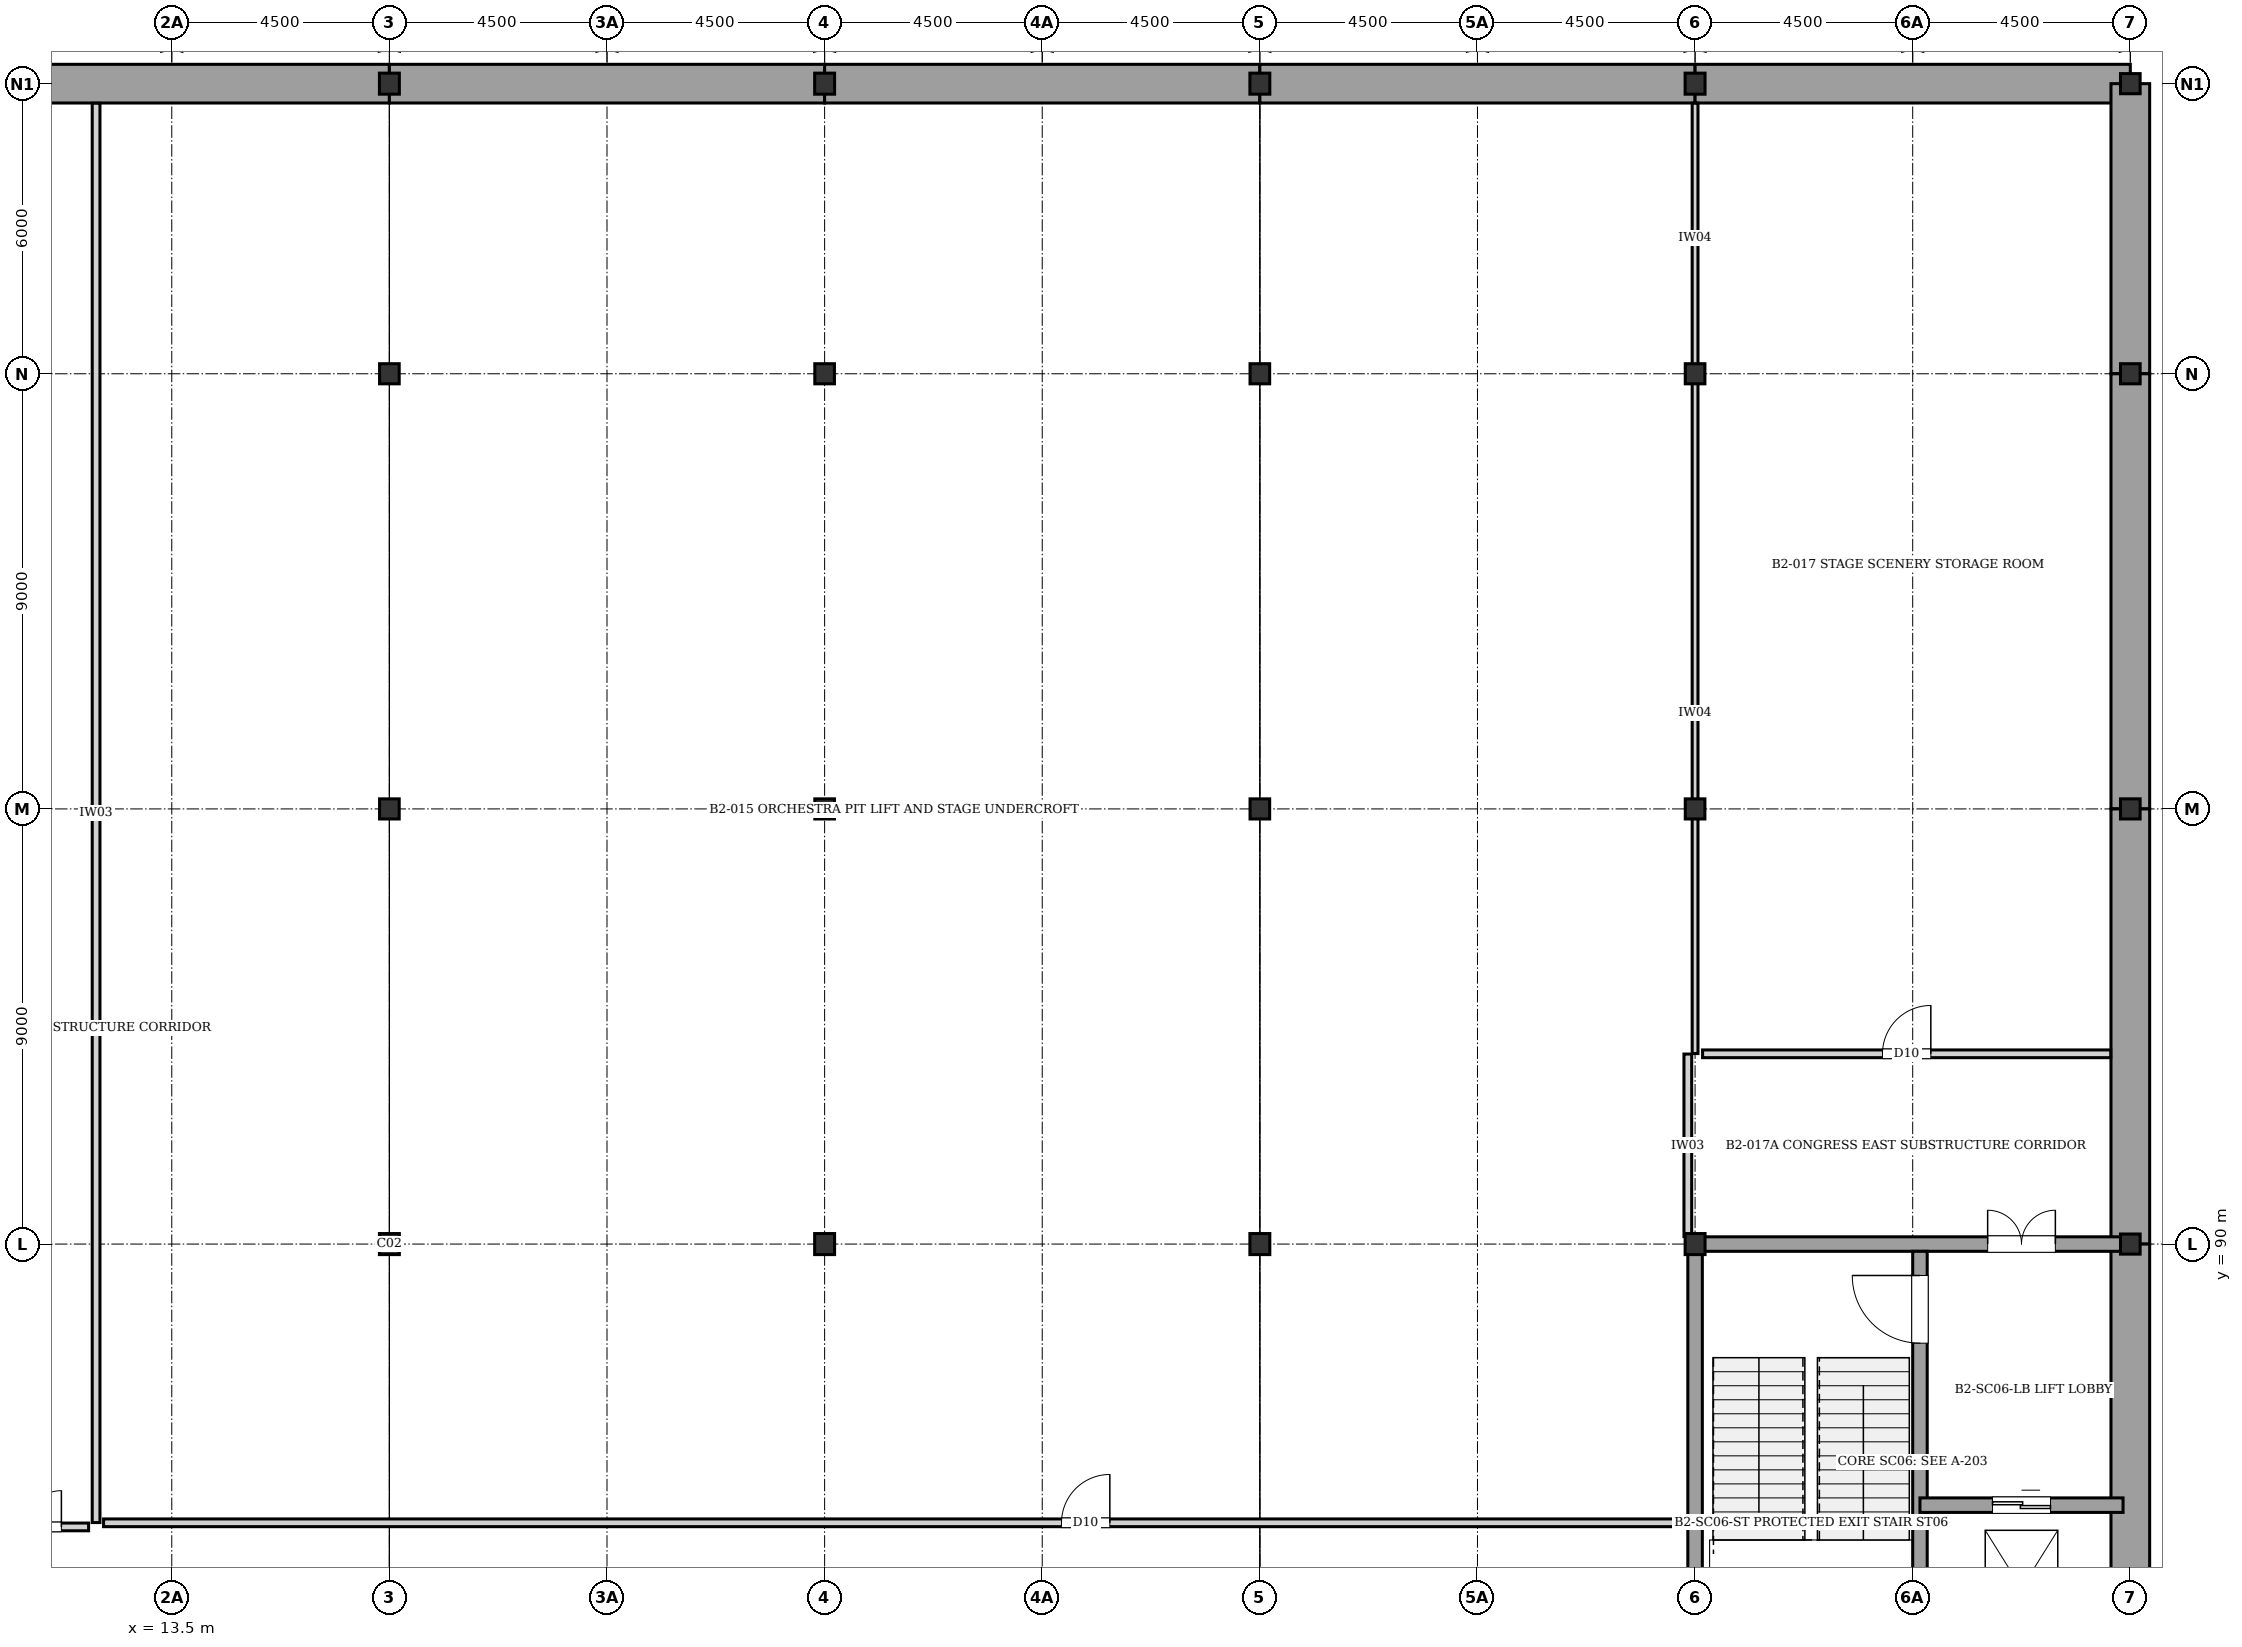
"""IFC4 building model, lengths in metres.
Left out: names, types, materials, properties, quantities, classifications, styles, units other than length and angle.
Written with IfcOpenShell. Run it as: python <this file> out.ifc"""

import sys

from ifc_helpers import new_model, si_unit, direction, frame, frame_2d, origin, origin_2d, place, context, subcontext, project, spatial, rectangle, i_section, extrude, element, fill, save


model = new_model("IFC4")
c1 = context("Model", 3, precision=1e-05, world=origin(), true_north=direction((0.0, 1.0)))
c2 = subcontext(c1, "Body", "Model", "MODEL_VIEW")
j1 = project(units=[si_unit("LENGTHUNIT", "METRE"), si_unit("PLANEANGLEUNIT", "RADIAN")], contexts=[c1])
p1 = place(None, origin())
s1 = spatial("IfcSite", under=j1, at=p1, CompositionType="ELEMENT")
p2 = place(p1, origin())
s2 = spatial("IfcBuilding", under=s1, at=p2, CompositionType="ELEMENT")
p3 = place(p2, frame((0.0, 0.0, -8.96)))
s3 = spatial("IfcBuildingStorey", under=s2, at=p3, CompositionType="ELEMENT", Elevation=-8.96)
p4 = place(p3, frame((18.0, 90.0, 0.0), z_axis=(0.0, 0.0, 1.0), x_axis=(1.0, 0.0, 0.0)))
e1 = element("IfcColumn", 1, at=p4, inside=s3, PredefinedType="COLUMN", context=c2, shape_type="SweptSolid", body=[
    extrude(i_section(OverallWidth=0.412, OverallDepth=0.435, WebThickness=0.027, FlangeThickness=0.046, at=origin_2d()), origin(), (0.0, 0.0, 1.0), 4.48),
])
for number, where, z_axis, x_axis in (
    (2, (18.0, 99.0, 0.0), (0.0, 0.0, 1.0), (1.0, 0.0, 0.0)),
    (3, (18.0, 108.0, 0.0), (0.0, 0.0, 1.0), (1.0, 0.0, 0.0)),
):
    element("IfcColumn", number, at=place(p3, frame(where, z_axis=z_axis, x_axis=x_axis)), inside=s3, PredefinedType="COLUMN", context=c2, shape_type="SweptSolid", body=[
        extrude(i_section(OverallWidth=0.406, OverallDepth=0.416, WebThickness=0.022, FlangeThickness=0.038, at=origin_2d()), origin(), (0.0, 0.0, 1.0), 4.48),
    ])
for number, where, z_axis, x_axis in (
    (4, (18.0, 114.0, 0.0), (0.0, 0.0, 1.0), (1.0, 0.0, 0.0)),
    (5, (27.0, 90.0, 0.0), (0.0, 0.0, 1.0), (1.0, 0.0, 0.0)),
):
    element("IfcColumn", number, at=place(p3, frame(where, z_axis=z_axis, x_axis=x_axis)), inside=s3, PredefinedType="COLUMN", context=c2, shape_type="SweptSolid", body=[
        extrude(i_section(OverallWidth=0.412, OverallDepth=0.435, WebThickness=0.027, FlangeThickness=0.046, at=origin_2d()), origin(), (0.0, 0.0, 1.0), 4.48),
    ])
for number, where, z_axis, x_axis in (
    (6, (27.0, 99.0, 0.0), (0.0, 0.0, 1.0), (1.0, 0.0, 0.0)),
    (7, (27.0, 108.0, 0.0), (0.0, 0.0, 1.0), (1.0, 0.0, 0.0)),
):
    element("IfcColumn", number, at=place(p3, frame(where, z_axis=z_axis, x_axis=x_axis)), inside=s3, PredefinedType="COLUMN", context=c2, shape_type="SweptSolid", body=[
        extrude(i_section(OverallWidth=0.406, OverallDepth=0.416, WebThickness=0.022, FlangeThickness=0.038, at=origin_2d()), origin(), (0.0, 0.0, 1.0), 4.48),
    ])
for number, where, z_axis, x_axis in (
    (8, (27.0, 114.0, 0.0), (0.0, 0.0, 1.0), (1.0, 0.0, 0.0)),
    (9, (36.0, 90.0, 0.0), (0.0, 0.0, 1.0), (1.0, 0.0, 0.0)),
):
    element("IfcColumn", number, at=place(p3, frame(where, z_axis=z_axis, x_axis=x_axis)), inside=s3, PredefinedType="COLUMN", context=c2, shape_type="SweptSolid", body=[
        extrude(i_section(OverallWidth=0.412, OverallDepth=0.435, WebThickness=0.027, FlangeThickness=0.046, at=origin_2d()), origin(), (0.0, 0.0, 1.0), 4.48),
    ])
for number, where, z_axis, x_axis in (
    (10, (36.0, 99.0, 0.0), (0.0, 0.0, 1.0), (1.0, 0.0, 0.0)),
    (11, (36.0, 108.0, 0.0), (0.0, 0.0, 1.0), (1.0, 0.0, 0.0)),
):
    element("IfcColumn", number, at=place(p3, frame(where, z_axis=z_axis, x_axis=x_axis)), inside=s3, PredefinedType="COLUMN", context=c2, shape_type="SweptSolid", body=[
        extrude(i_section(OverallWidth=0.406, OverallDepth=0.416, WebThickness=0.022, FlangeThickness=0.038, at=origin_2d()), origin(), (0.0, 0.0, 1.0), 4.48),
    ])
for number, where, z_axis, x_axis in (
    (12, (36.0, 114.0, 0.0), (0.0, 0.0, 1.0), (1.0, 0.0, 0.0)),
    (13, (45.0, 90.0, 0.0), (0.0, 0.0, 1.0), (1.0, 0.0, 0.0)),
):
    element("IfcColumn", number, at=place(p3, frame(where, z_axis=z_axis, x_axis=x_axis)), inside=s3, PredefinedType="COLUMN", context=c2, shape_type="SweptSolid", body=[
        extrude(i_section(OverallWidth=0.412, OverallDepth=0.435, WebThickness=0.027, FlangeThickness=0.046, at=origin_2d()), origin(), (0.0, 0.0, 1.0), 4.48),
    ])
for number, where, z_axis, x_axis in (
    (14, (45.0, 99.0, 0.0), (0.0, 0.0, 1.0), (1.0, 0.0, 0.0)),
    (15, (45.0, 108.0, 0.0), (0.0, 0.0, 1.0), (1.0, 0.0, 0.0)),
):
    element("IfcColumn", number, at=place(p3, frame(where, z_axis=z_axis, x_axis=x_axis)), inside=s3, PredefinedType="COLUMN", context=c2, shape_type="SweptSolid", body=[
        extrude(i_section(OverallWidth=0.406, OverallDepth=0.416, WebThickness=0.022, FlangeThickness=0.038, at=origin_2d()), origin(), (0.0, 0.0, 1.0), 4.48),
    ])
p5 = place(p3, frame((45.0, 114.0, 0.0), z_axis=(0.0, 0.0, 1.0), x_axis=(1.0, 0.0, 0.0)))
e16 = element("IfcColumn", 16, at=p5, inside=s3, PredefinedType="COLUMN", context=c2, shape_type="SweptSolid", body=[
    extrude(i_section(OverallWidth=0.412, OverallDepth=0.435, WebThickness=0.027, FlangeThickness=0.046, at=origin_2d()), origin(), (0.0, 0.0, 1.0), 4.48),
])
for number, where, z_axis, x_axis in (
    (17, (54.0, 90.0, 0.0), (0.0, 0.0, 1.0), (1.0, 0.0, 0.0)),
    (18, (54.0, 99.0, 0.0), (0.0, 0.0, 1.0), (1.0, 0.0, 0.0)),
    (19, (54.0, 108.0, 0.0), (0.0, 0.0, 1.0), (1.0, 0.0, 0.0)),
    (20, (54.0, 114.0, 0.0), (0.0, 0.0, 1.0), (1.0, 0.0, 0.0)),
):
    element("IfcColumn", number, at=place(p3, frame(where, z_axis=z_axis, x_axis=x_axis)), inside=s3, PredefinedType="COLUMN", context=c2, shape_type="SweptSolid", body=[
        extrude(i_section(OverallWidth=0.406, OverallDepth=0.416, WebThickness=0.022, FlangeThickness=0.038, at=origin_2d()), origin(), (0.0, 0.0, 1.0), 4.48),
    ])
for number, where, z_axis, x_axis in (
    (21, (9.0, 114.0, 0.0), (0.0, 0.0, 1.0), (1.0, 0.0, 0.0)),
    (22, (18.0, 114.0, 0.0), (0.0, 0.0, 1.0), (1.0, 0.0, 0.0)),
    (23, (27.0, 114.0, 0.0), (0.0, 0.0, 1.0), (1.0, 0.0, 0.0)),
    (24, (36.0, 114.0, 0.0), (0.0, 0.0, 1.0), (1.0, 0.0, 0.0)),
    (25, (45.0, 114.0, 0.0), (0.0, 0.0, 1.0), (1.0, 0.0, 0.0)),
):
    element("IfcWall", number, at=place(p3, frame(where, z_axis=z_axis, x_axis=x_axis)), inside=s3, PredefinedType="USERDEFINED", context=c2, shape_type="SweptSolid", body=[
        extrude(rectangle(XDim=9.0, YDim=0.8, at=frame_2d((4.5, 0.0))), origin(), (0.0, 0.0, 1.0), 4.2),
    ])
p6 = place(p3, frame((54.0, 114.0, 0.0), z_axis=(0.0, 0.0, 1.0), x_axis=(0.0, -1.0, 0.0)))
e26 = element("IfcWall", 26, at=p6, inside=s3, PredefinedType="USERDEFINED", context=c2, shape_type="SweptSolid", body=[
    extrude(rectangle(XDim=6.0, YDim=0.8, at=frame_2d((3.0, 0.0))), origin(), (0.0, 0.0, 1.0), 4.2),
])
for number, where, z_axis, x_axis in (
    (27, (54.0, 108.0, 0.0), (0.0, 0.0, 1.0), (0.0, -1.0, 0.0)),
    (28, (54.0, 99.0, 0.0), (0.0, 0.0, 1.0), (0.0, -1.0, 0.0)),
    (29, (54.0, 90.0, 0.0), (0.0, 0.0, 1.0), (0.0, -1.0, 0.0)),
):
    element("IfcWall", number, at=place(p3, frame(where, z_axis=z_axis, x_axis=x_axis)), inside=s3, PredefinedType="USERDEFINED", context=c2, shape_type="SweptSolid", body=[
        extrude(rectangle(XDim=9.0, YDim=0.8, at=frame_2d((4.5, 0.0))), origin(), (0.0, 0.0, 1.0), 4.2),
    ])
p7 = place(p3, frame((45.0, 90.0, 0.0), z_axis=(0.0, 0.0, 1.0), x_axis=(1.0, 0.0, 0.0)))
e30 = element("IfcWall", 30, at=p7, inside=s3, PredefinedType="SHEAR", context=c2, shape_type="SweptSolid", body=[
    extrude(rectangle(XDim=9.0, YDim=0.3, at=frame_2d((4.5, 0.0))), origin(), (0.0, 0.0, 1.0), 4.2),
])
p8 = place(p7, frame((6.05, 0.0, 0.0)))
e31 = element("IfcOpeningElement", 31, at=p8, cuts=e30, PredefinedType="OPENING", context=c2, shape_type="SweptSolid", body=[
    extrude(rectangle(XDim=1.4, YDim=2.02, at=frame_2d((0.7, 1.01))), frame((0.0, 0.16, 0.0), z_axis=(0.0, -1.0, 0.0), x_axis=(1.0, 0.0, 0.0)), (0.0, 0.0, 1.0), 0.32),
])
p9 = place(p3, frame((45.0, 81.0, 0.0), z_axis=(0.0, 0.0, 1.0), x_axis=(0.0, 1.0, 0.0)))
e32 = element("IfcWall", 32, at=p9, inside=s3, PredefinedType="SHEAR", context=c2, shape_type="SweptSolid", body=[
    extrude(rectangle(XDim=9.0, YDim=0.3, at=frame_2d((4.5, 0.0))), origin(), (0.0, 0.0, 1.0), 4.2),
])
p10 = place(p3, frame((49.65, 81.15, 0.0), z_axis=(0.0, 0.0, 1.0), x_axis=(0.0, 1.0, 0.0)))
e33 = element("IfcWall", 33, at=p10, inside=s3, PredefinedType="SHEAR", context=c2, shape_type="SweptSolid", body=[
    extrude(rectangle(XDim=8.7, YDim=0.3, at=frame_2d((4.35, 0.0))), origin(), (0.0, 0.0, 1.0), 4.2),
])
p11 = place(p10, frame((6.8, 0.0, 0.0)))
e34 = element("IfcOpeningElement", 34, at=p11, cuts=e33, PredefinedType="OPENING", context=c2, shape_type="SweptSolid", body=[
    extrude(rectangle(XDim=1.4, YDim=2.02, at=frame_2d((0.7, 1.01))), frame((0.0, 0.16, 0.0), z_axis=(0.0, -1.0, 0.0), x_axis=(1.0, 0.0, 0.0)), (0.0, 0.0, 1.0), 0.32),
])
p12 = place(p3, frame((49.65, 84.6, 0.0), z_axis=(0.0, 0.0, 1.0), x_axis=(1.0, 0.0, 0.0)))
e35 = element("IfcWall", 35, at=p12, inside=s3, PredefinedType="SHEAR", context=c2, shape_type="SweptSolid", body=[
    extrude(rectangle(XDim=4.2, YDim=0.3, at=frame_2d((2.1, 0.0))), origin(), (0.0, 0.0, 1.0), 4.2),
])
p13 = place(p12, frame((1.5, 0.0, 0.0)))
e36 = element("IfcOpeningElement", 36, at=p13, cuts=e35, PredefinedType="OPENING", context=c2, shape_type="SweptSolid", body=[
    extrude(rectangle(XDim=1.2, YDim=2.2, at=frame_2d((0.6, 1.1))), frame((0.0, 0.16, 0.0), z_axis=(0.0, -1.0, 0.0), x_axis=(1.0, 0.0, 0.0)), (0.0, 0.0, 1.0), 0.32),
])
p14 = place(p3, frame((11.935, 84.24, 0.0), z_axis=(0.0, 0.0, 1.0), x_axis=(0.0, 1.0, 0.0)))
e37 = element("IfcWall", 37, at=p14, inside=s3, PredefinedType="PARTITIONING", context=c2, shape_type="SweptSolid", body=[
    extrude(rectangle(XDim=29.355, YDim=0.16, at=frame_2d((14.677, 0.0))), origin(), (0.0, 0.0, 1.0), 4.2),
])
p15 = place(p3, frame((44.85, 90.155, 0.0), z_axis=(0.0, 0.0, 1.0), x_axis=(0.0, 1.0, 0.0)))
e38 = element("IfcWall", 38, at=p15, inside=s3, PredefinedType="PARTITIONING", context=c2, shape_type="SweptSolid", body=[
    extrude(rectangle(XDim=3.775, YDim=0.16, at=frame_2d((1.887, 0.0))), origin(), (0.0, 0.0, 1.0), 3.3),
])
p16 = place(p3, frame((45.0, 93.94, 0.0), z_axis=(0.0, 0.0, 1.0), x_axis=(0.0, 1.0, 0.0)))
e39 = element("IfcWall", 39, at=p16, inside=s3, PredefinedType="PARTITIONING", context=c2, shape_type="SweptSolid", body=[
    extrude(rectangle(XDim=14.08, YDim=0.12, at=frame_2d((7.04, 0.0))), origin(), (0.0, 0.0, 1.0), 3.3),
])
p17 = place(p3, frame((9.155, 84.15, 0.0), z_axis=(0.0, 0.0, 1.0), x_axis=(1.0, 0.0, 0.0)))
e40 = element("IfcWall", 40, at=p17, inside=s3, PredefinedType="PARTITIONING", context=c2, shape_type="SweptSolid", body=[
    extrude(rectangle(XDim=2.625, YDim=0.16, at=frame_2d((1.312, 0.0))), origin(), (0.0, 0.0, 1.0), 4.2),
])
p18 = place(p17, frame((0.562, 0.0, 0.0)))
e41 = element("IfcOpeningElement", 41, at=p18, cuts=e40, PredefinedType="OPENING", context=c2, shape_type="SweptSolid", body=[
    extrude(rectangle(XDim=1.5, YDim=2.1, at=frame_2d((0.75, 1.05))), frame((0.0, 0.09, 0.0), z_axis=(0.0, -1.0, 0.0), x_axis=(1.0, 0.0, 0.0)), (0.0, 0.0, 1.0), 0.18),
])
p19 = place(p3, frame((12.09, 84.235, 0.0), z_axis=(0.0, 0.0, 1.0), x_axis=(1.0, 0.0, 0.0)))
e42 = element("IfcWall", 42, at=p19, inside=s3, PredefinedType="PARTITIONING", context=c2, shape_type="SweptSolid", body=[
    extrude(rectangle(XDim=32.755, YDim=0.16, at=frame_2d((16.377, 0.0))), origin(), (0.0, 0.0, 1.0), 4.2),
])
p20 = place(p19, frame((19.808, 0.0, 0.0)))
e43 = element("IfcOpeningElement", 43, at=p20, cuts=e42, PredefinedType="OPENING", context=c2, shape_type="SweptSolid", body=[
    extrude(rectangle(XDim=1.0, YDim=2.1, at=frame_2d((0.5, 1.05))), frame((0.0, 0.09, 0.0), z_axis=(0.0, -1.0, 0.0), x_axis=(1.0, 0.0, 0.0)), (0.0, 0.0, 1.0), 0.18),
])
p21 = place(p3, frame((45.155, 93.935, 0.0), z_axis=(0.0, 0.0, 1.0), x_axis=(1.0, 0.0, 0.0)))
e44 = element("IfcWall", 44, at=p21, inside=s3, PredefinedType="PARTITIONING", context=c2, shape_type="SweptSolid", body=[
    extrude(rectangle(XDim=8.44, YDim=0.16, at=frame_2d((4.22, 0.0))), origin(), (0.0, 0.0, 1.0), 4.2),
])
p22 = place(p21, frame((3.72, 0.0, 0.0)))
e45 = element("IfcOpeningElement", 45, at=p22, cuts=e44, PredefinedType="OPENING", context=c2, shape_type="SweptSolid", body=[
    extrude(rectangle(XDim=1.0, YDim=2.1, at=frame_2d((0.5, 1.05))), frame((0.0, 0.09, 0.0), z_axis=(0.0, -1.0, 0.0), x_axis=(1.0, 0.0, 0.0)), (0.0, 0.0, 1.0), 0.18),
])
p23 = place(p3, frame((45.0, 108.02, 0.0), z_axis=(0.0, 0.0, 1.0), x_axis=(0.0, 1.0, 0.0)))
e46 = element("IfcWall", 46, at=p23, inside=s3, PredefinedType="PARTITIONING", context=c2, shape_type="SweptSolid", body=[
    extrude(rectangle(XDim=5.575, YDim=0.12, at=frame_2d((2.788, 0.0))), origin(), (0.0, 0.0, 1.0), 3.5),
])
p24 = place(p8, origin())
e47 = element("IfcDoor", 47, at=p24, inside=s3, OperationType="DOUBLE_DOOR_SINGLE_SWING", PredefinedType="DOOR", context=c2, shape_type="SweptSolid", body=[
    extrude(rectangle(XDim=1.4, YDim=2.02, at=frame_2d((0.7, 1.01))), frame((0.0, 0.025, 0.0), z_axis=(0.0, -1.0, 0.0), x_axis=(1.0, 0.0, 0.0)), (0.0, 0.0, 1.0), 0.05),
])
fill(e31, e47)
p25 = place(p11, origin())
e48 = element("IfcDoor", 48, at=p25, inside=s3, OperationType="SINGLE_SWING_RIGHT", PredefinedType="DOOR", context=c2, shape_type="SweptSolid", body=[
    extrude(rectangle(XDim=1.4, YDim=2.02, at=frame_2d((0.7, 1.01))), frame((0.0, 0.025, 0.0), z_axis=(0.0, -1.0, 0.0), x_axis=(1.0, 0.0, 0.0)), (0.0, 0.0, 1.0), 0.05),
])
fill(e34, e48)
p26 = place(p13, origin())
e49 = element("IfcDoor", 49, at=p26, inside=s3, OperationType="DOUBLE_DOOR_SLIDING", PredefinedType="DOOR", context=c2, shape_type="SweptSolid", body=[
    extrude(rectangle(XDim=1.2, YDim=2.2, at=frame_2d((0.6, 1.1))), frame((0.0, 0.025, 0.0), z_axis=(0.0, -1.0, 0.0), x_axis=(1.0, 0.0, 0.0)), (0.0, 0.0, 1.0), 0.05),
])
fill(e36, e49)
p27 = place(p18, origin())
e50 = element("IfcDoor", 50, at=p27, inside=s3, OperationType="DOUBLE_DOOR_SINGLE_SWING", PredefinedType="DOOR", context=c2, shape_type="SweptSolid", body=[
    extrude(rectangle(XDim=1.5, YDim=2.1, at=frame_2d((0.75, 1.05))), frame((0.0, 0.025, 0.0), z_axis=(0.0, -1.0, 0.0), x_axis=(1.0, 0.0, 0.0)), (0.0, 0.0, 1.0), 0.05),
])
fill(e41, e50)
p28 = place(p20, origin())
e51 = element("IfcDoor", 51, at=p28, inside=s3, OperationType="SINGLE_SWING_RIGHT", PredefinedType="DOOR", context=c2, shape_type="SweptSolid", body=[
    extrude(rectangle(XDim=1.0, YDim=2.1, at=frame_2d((0.5, 1.05))), frame((0.0, 0.025, 0.0), z_axis=(0.0, -1.0, 0.0), x_axis=(1.0, 0.0, 0.0)), (0.0, 0.0, 1.0), 0.05),
])
fill(e43, e51)
p29 = place(p22, origin())
e52 = element("IfcDoor", 52, at=p29, inside=s3, OperationType="SINGLE_SWING_RIGHT", PredefinedType="DOOR", context=c2, shape_type="SweptSolid", body=[
    extrude(rectangle(XDim=1.0, YDim=2.1, at=frame_2d((0.5, 1.05))), frame((0.0, 0.025, 0.0), z_axis=(0.0, -1.0, 0.0), x_axis=(1.0, 0.0, 0.0)), (0.0, 0.0, 1.0), 0.05),
])
fill(e45, e52)
save(model, sys.argv[1])
